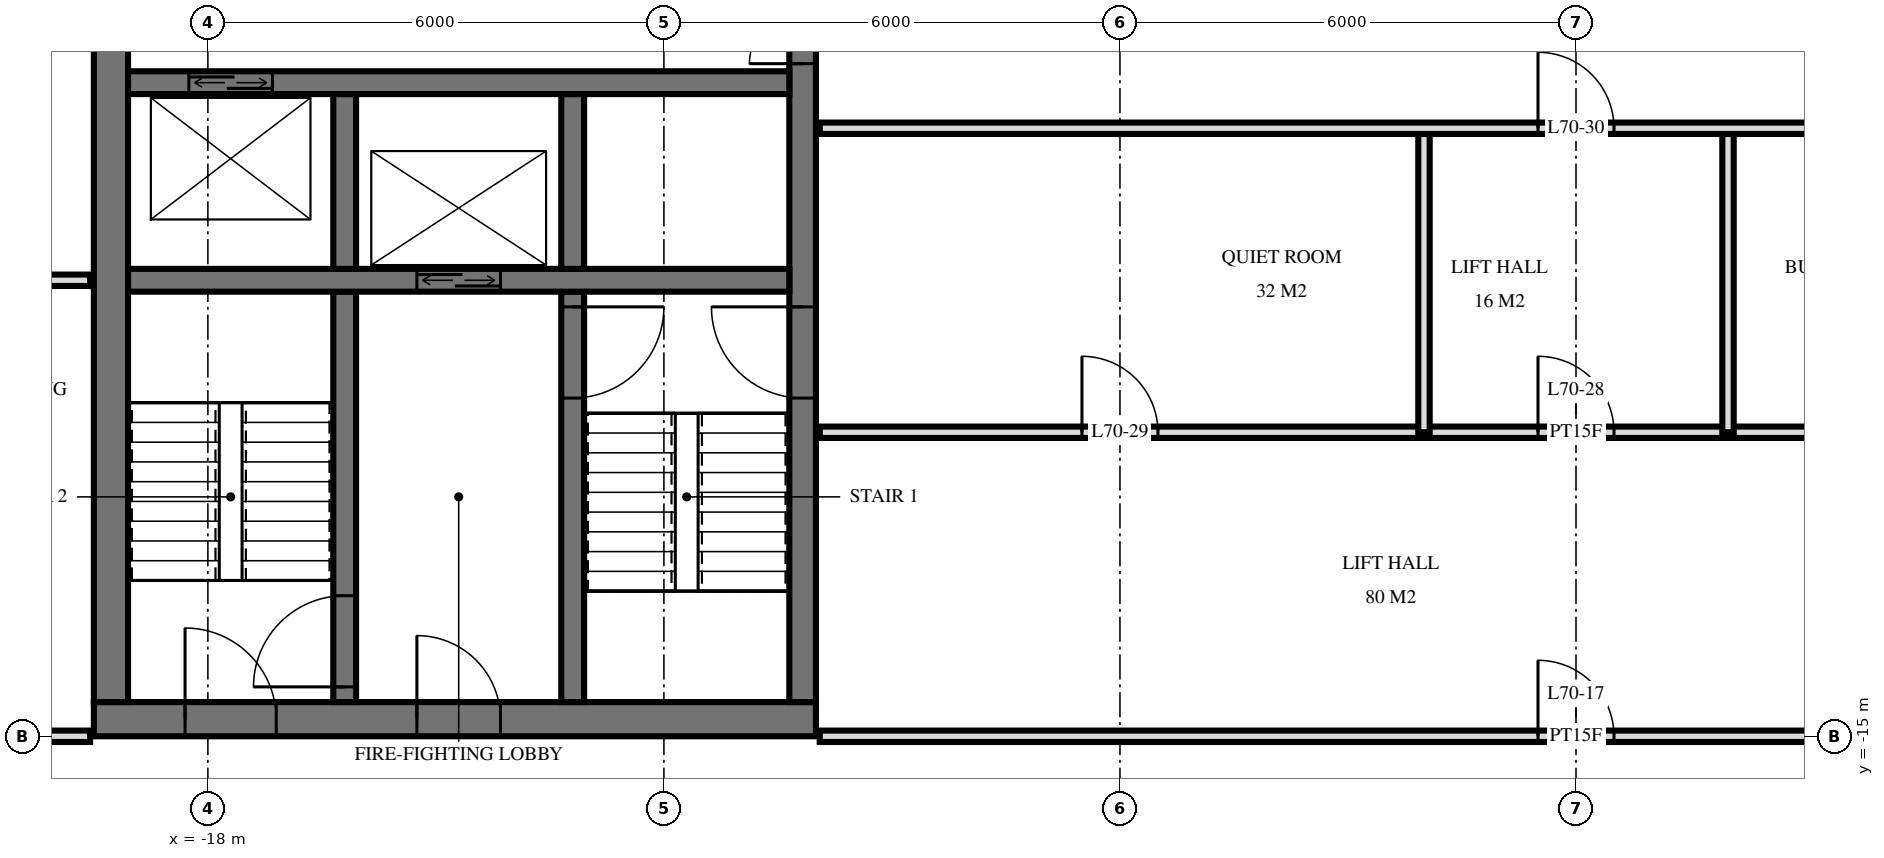
"""IFC4 building model, lengths in metres.
Left out: names, types, materials, properties, quantities, classifications, styles, units other than length and angle.
Written with IfcOpenShell. Run it as: python <this file> out.ifc"""

import sys

from ifc_helpers import new_model, si_unit, direction, frame, frame_2d, origin, place, context, subcontext, project, spatial, rectangle, extrude, element, fill, save


model = new_model("IFC4")
c1 = context("Model", 3, precision=1e-05, world=origin(), true_north=direction((0.0, 1.0)))
c2 = subcontext(c1, "Body", "Model", "MODEL_VIEW")
j1 = project(units=[si_unit("LENGTHUNIT", "METRE"), si_unit("PLANEANGLEUNIT", "RADIAN")], contexts=[c1])
p1 = place(None, origin())
s1 = spatial("IfcSite", under=j1, at=p1, CompositionType="ELEMENT")
p2 = place(p1, origin())
s2 = spatial("IfcBuilding", under=s1, at=p2, CompositionType="ELEMENT")
p3 = place(p2, frame((0.0, 0.0, 266.6)))
s3 = spatial("IfcBuildingStorey", under=s2, at=p3, CompositionType="ELEMENT", Elevation=266.6)
p4 = place(p3, frame((-19.5, -14.775, 0.0), z_axis=(0.0, 0.0, 1.0), x_axis=(1.0, 0.0, 0.0)))
e1 = element("IfcWall", 1, at=p4, inside=s3, PredefinedType="SHEAR", context=c2, shape_type="SweptSolid", body=[
    extrude(rectangle(XDim=9.5, YDim=0.45, at=frame_2d((4.75, 0.0))), origin(), (0.0, 0.0, 1.0), 3.5),
])
p5 = place(p4, frame((1.2, 0.0, 0.0)))
e2 = element("IfcOpeningElement", 2, at=p5, cuts=e1, PredefinedType="OPENING", context=c2, shape_type="SweptSolid", body=[
    extrude(rectangle(XDim=1.2, YDim=2.1, at=frame_2d((0.6, 1.05))), frame((0.0, 0.235, 0.0), z_axis=(0.0, -1.0, 0.0), x_axis=(1.0, 0.0, 0.0)), (0.0, 0.0, 1.0), 0.47),
])
p6 = place(p4, frame((4.25, 0.0, 0.0)))
e3 = element("IfcOpeningElement", 3, at=p6, cuts=e1, PredefinedType="OPENING", context=c2, shape_type="SweptSolid", body=[
    extrude(rectangle(XDim=1.1, YDim=2.1, at=frame_2d((0.55, 1.05))), frame((0.0, 0.235, 0.0), z_axis=(0.0, -1.0, 0.0), x_axis=(1.0, 0.0, 0.0)), (0.0, 0.0, 1.0), 0.47),
])
p7 = place(p3, frame((-10.175, -14.55, 0.0), z_axis=(0.0, 0.0, 1.0), x_axis=(0.0, 1.0, 0.0)))
e4 = element("IfcWall", 4, at=p7, inside=s3, PredefinedType="SHEAR", context=c2, shape_type="SweptSolid", body=[
    extrude(rectangle(XDim=14.1, YDim=0.35, at=frame_2d((7.05, 0.0))), origin(), (0.0, 0.0, 1.0), 3.5),
])
p8 = place(p7, frame((8.4, 0.0, 0.0)))
e5 = element("IfcOpeningElement", 5, at=p8, cuts=e4, PredefinedType="OPENING", context=c2, shape_type="SweptSolid", body=[
    extrude(rectangle(XDim=1.4, YDim=2.4, at=frame_2d((0.7, 1.2))), frame((0.0, 0.185, 0.0), z_axis=(0.0, -1.0, 0.0), x_axis=(1.0, 0.0, 0.0)), (0.0, 0.0, 1.0), 0.37),
])
p9 = place(p7, frame((10.0, 0.0, 0.0)))
e6 = element("IfcOpeningElement", 6, at=p9, cuts=e4, PredefinedType="OPENING", context=c2, shape_type="SweptSolid", body=[
    extrude(rectangle(XDim=1.4, YDim=2.4, at=frame_2d((0.7, 1.2))), frame((0.0, 0.185, 0.0), z_axis=(0.0, -1.0, 0.0), x_axis=(1.0, 0.0, 0.0)), (0.0, 0.0, 1.0), 0.37),
])
p10 = place(p7, frame((4.0, 0.0, 0.0)))
e7 = element("IfcOpeningElement", 7, at=p10, cuts=e4, PredefinedType="OPENING", context=c2, shape_type="SweptSolid", body=[
    extrude(rectangle(XDim=1.2, YDim=2.1, at=frame_2d((0.6, 1.05))), frame((0.0, 0.185, 0.0), z_axis=(0.0, -1.0, 0.0), x_axis=(1.0, 0.0, 0.0)), (0.0, 0.0, 1.0), 0.37),
])
p11 = place(p3, frame((-19.275, -14.55, 0.0), z_axis=(0.0, 0.0, 1.0), x_axis=(0.0, 1.0, 0.0)))
e8 = element("IfcWall", 8, at=p11, inside=s3, PredefinedType="SHEAR", context=c2, shape_type="SweptSolid", body=[
    extrude(rectangle(XDim=14.1, YDim=0.45, at=frame_2d((7.05, 0.0))), origin(), (0.0, 0.0, 1.0), 3.5),
])
p12 = place(p3, frame((-19.05, -6.4, 0.0), z_axis=(0.0, 0.0, 1.0), x_axis=(1.0, 0.0, 0.0)))
e9 = element("IfcWall", 9, at=p12, inside=s3, PredefinedType="SHEAR", context=c2, shape_type="SweptSolid", body=[
    extrude(rectangle(XDim=8.7, YDim=0.3, at=frame_2d((4.35, 0.0))), origin(), (0.0, 0.0, 1.0), 3.5),
])
p13 = place(p12, frame((0.8, 0.0, 0.0)))
e10 = element("IfcOpeningElement", 10, at=p13, cuts=e9, PredefinedType="OPENING", context=c2, shape_type="SweptSolid", body=[
    extrude(rectangle(XDim=1.1, YDim=2.1, at=frame_2d((0.55, 1.05))), frame((0.0, 0.16, 0.0), z_axis=(0.0, -1.0, 0.0), x_axis=(1.0, 0.0, 0.0)), (0.0, 0.0, 1.0), 0.32),
])
p14 = place(p3, frame((-19.05, -9.0, 0.0), z_axis=(0.0, 0.0, 1.0), x_axis=(1.0, 0.0, 0.0)))
e11 = element("IfcWall", 11, at=p14, inside=s3, PredefinedType="SHEAR", context=c2, shape_type="SweptSolid", body=[
    extrude(rectangle(XDim=8.7, YDim=0.3, at=frame_2d((4.35, 0.0))), origin(), (0.0, 0.0, 1.0), 3.5),
])
p15 = place(p14, frame((3.8, 0.0, 0.0)))
e12 = element("IfcOpeningElement", 12, at=p15, cuts=e11, PredefinedType="OPENING", context=c2, shape_type="SweptSolid", body=[
    extrude(rectangle(XDim=1.1, YDim=2.1, at=frame_2d((0.55, 1.05))), frame((0.0, 0.16, 0.0), z_axis=(0.0, -1.0, 0.0), x_axis=(1.0, 0.0, 0.0)), (0.0, 0.0, 1.0), 0.32),
])
p16 = place(p3, frame((-13.2, -8.85, 0.0), z_axis=(0.0, 0.0, 1.0), x_axis=(0.0, 1.0, 0.0)))
e13 = element("IfcWall", 13, at=p16, inside=s3, PredefinedType="SHEAR", context=c2, shape_type="SweptSolid", body=[
    extrude(rectangle(XDim=2.3, YDim=0.3, at=frame_2d((1.15, 0.0))), origin(), (0.0, 0.0, 1.0), 3.5),
])
p17 = place(p3, frame((-13.2, -14.55, 0.0), z_axis=(0.0, 0.0, 1.0), x_axis=(0.0, 1.0, 0.0)))
e14 = element("IfcWall", 14, at=p17, inside=s3, PredefinedType="SHEAR", context=c2, shape_type="SweptSolid", body=[
    extrude(rectangle(XDim=5.4, YDim=0.3, at=frame_2d((2.7, 0.0))), origin(), (0.0, 0.0, 1.0), 3.5),
])
p18 = place(p17, frame((4.0, 0.0, 0.0)))
e15 = element("IfcOpeningElement", 15, at=p18, cuts=e14, PredefinedType="OPENING", context=c2, shape_type="SweptSolid", body=[
    extrude(rectangle(XDim=1.2, YDim=2.1, at=frame_2d((0.6, 1.05))), frame((0.0, 0.16, 0.0), z_axis=(0.0, -1.0, 0.0), x_axis=(1.0, 0.0, 0.0)), (0.0, 0.0, 1.0), 0.32),
])
p19 = place(p3, frame((-16.2, -8.85, 0.0), z_axis=(0.0, 0.0, 1.0), x_axis=(0.0, 1.0, 0.0)))
e16 = element("IfcWall", 16, at=p19, inside=s3, PredefinedType="SHEAR", context=c2, shape_type="SweptSolid", body=[
    extrude(rectangle(XDim=2.3, YDim=0.3, at=frame_2d((1.15, 0.0))), origin(), (0.0, 0.0, 1.0), 3.5),
])
p20 = place(p3, frame((-16.2, -14.55, 0.0), z_axis=(0.0, 0.0, 1.0), x_axis=(0.0, 1.0, 0.0)))
e17 = element("IfcWall", 17, at=p20, inside=s3, PredefinedType="SHEAR", context=c2, shape_type="SweptSolid", body=[
    extrude(rectangle(XDim=5.4, YDim=0.3, at=frame_2d((2.7, 0.0))), origin(), (0.0, 0.0, 1.0), 3.5),
])
p21 = place(p20, frame((0.2, 0.0, 0.0)))
e18 = element("IfcOpeningElement", 18, at=p21, cuts=e17, PredefinedType="OPENING", context=c2, shape_type="SweptSolid", body=[
    extrude(rectangle(XDim=1.2, YDim=2.1, at=frame_2d((0.6, 1.05))), frame((0.0, 0.16, 0.0), z_axis=(0.0, -1.0, 0.0), x_axis=(1.0, 0.0, 0.0)), (0.0, 0.0, 1.0), 0.32),
])
for number, where, z_axis, x_axis in (
    (19, (2.0, -11.0, 0.0), (0.0, 0.0, 1.0), (0.0, 1.0, 0.0)),
    (20, (-2.0, -11.0, 0.0), (0.0, 0.0, 1.0), (0.0, 1.0, 0.0)),
):
    element("IfcWall", number, at=place(p3, frame(where, z_axis=z_axis, x_axis=x_axis)), inside=s3, PredefinedType="PARTITIONING", context=c2, shape_type="SweptSolid", body=[
        extrude(rectangle(XDim=4.0, YDim=0.15, at=frame_2d((2.0, 0.0))), origin(), (0.0, 0.0, 1.0), 3.22),
    ])
p22 = place(p3, frame((-22.92, -15.0, 0.0), z_axis=(0.0, 0.0, 1.0), x_axis=(1.0, 0.0, 0.0)))
e21 = element("IfcWall", 21, at=p22, inside=s3, PredefinedType="PARTITIONING", context=c2, shape_type="SweptSolid", body=[
    extrude(rectangle(XDim=3.37, YDim=0.15, at=frame_2d((1.685, 0.0))), origin(), (0.0, 0.0, 1.0), 3.22),
])
p23 = place(p22, frame((1.47, 0.0, 0.0)))
e22 = element("IfcOpeningElement", 22, at=p23, cuts=e21, PredefinedType="OPENING", context=c2, shape_type="SweptSolid", body=[
    extrude(rectangle(XDim=1.0, YDim=2.1, at=frame_2d((0.5, 1.05))), frame((0.0, 0.085, 0.0), z_axis=(0.0, -1.0, 0.0), x_axis=(1.0, 0.0, 0.0)), (0.0, 0.0, 1.0), 0.17),
])
p24 = place(p3, frame((-9.95, -15.0, 0.0), z_axis=(0.0, 0.0, 1.0), x_axis=(1.0, 0.0, 0.0)))
e23 = element("IfcWall", 23, at=p24, inside=s3, PredefinedType="PARTITIONING", context=c2, shape_type="SweptSolid", body=[
    extrude(rectangle(XDim=19.9, YDim=0.15, at=frame_2d((9.95, 0.0))), origin(), (0.0, 0.0, 1.0), 2.584),
])
p25 = place(p24, frame((9.45, 0.0, 0.0)))
e24 = element("IfcOpeningElement", 24, at=p25, cuts=e23, PredefinedType="OPENING", context=c2, shape_type="SweptSolid", body=[
    extrude(rectangle(XDim=1.0, YDim=2.1, at=frame_2d((0.5, 1.05))), frame((0.0, 0.085, 0.0), z_axis=(0.0, -1.0, 0.0), x_axis=(1.0, 0.0, 0.0)), (0.0, 0.0, 1.0), 0.17),
])
p26 = place(p3, frame((-9.95, -11.0, 0.0), z_axis=(0.0, 0.0, 1.0), x_axis=(1.0, 0.0, 0.0)))
e25 = element("IfcWall", 25, at=p26, inside=s3, PredefinedType="PARTITIONING", context=c2, shape_type="SweptSolid", body=[
    extrude(rectangle(XDim=19.9, YDim=0.15, at=frame_2d((9.95, 0.0))), origin(), (0.0, 0.0, 1.0), 3.22),
])
p27 = place(p26, frame((9.45, 0.0, 0.0)))
e26 = element("IfcOpeningElement", 26, at=p27, cuts=e25, PredefinedType="OPENING", context=c2, shape_type="SweptSolid", body=[
    extrude(rectangle(XDim=1.0, YDim=2.1, at=frame_2d((0.5, 1.05))), frame((0.0, 0.085, 0.0), z_axis=(0.0, -1.0, 0.0), x_axis=(1.0, 0.0, 0.0)), (0.0, 0.0, 1.0), 0.17),
])
p28 = place(p26, frame((3.45, 0.0, 0.0)))
e27 = element("IfcOpeningElement", 27, at=p28, cuts=e25, PredefinedType="OPENING", context=c2, shape_type="SweptSolid", body=[
    extrude(rectangle(XDim=1.0, YDim=2.1, at=frame_2d((0.5, 1.05))), frame((0.0, 0.085, 0.0), z_axis=(0.0, -1.0, 0.0), x_axis=(1.0, 0.0, 0.0)), (0.0, 0.0, 1.0), 0.17),
])
p29 = place(p3, frame((-22.92, -9.0, 0.0), z_axis=(0.0, 0.0, 1.0), x_axis=(1.0, 0.0, 0.0)))
e28 = element("IfcWall", 28, at=p29, inside=s3, PredefinedType="PARTITIONING", context=c2, shape_type="SweptSolid", body=[
    extrude(rectangle(XDim=3.37, YDim=0.15, at=frame_2d((1.685, 0.0))), origin(), (0.0, 0.0, 1.0), 3.22),
])
p30 = place(p29, frame((1.17, 0.0, 0.0)))
e29 = element("IfcOpeningElement", 29, at=p30, cuts=e28, PredefinedType="OPENING", context=c2, shape_type="SweptSolid", body=[
    extrude(rectangle(XDim=0.9, YDim=2.1, at=frame_2d((0.45, 1.05))), frame((0.0, 0.085, 0.0), z_axis=(0.0, -1.0, 0.0), x_axis=(1.0, 0.0, 0.0)), (0.0, 0.0, 1.0), 0.17),
])
p31 = place(p3, frame((-9.95, -7.0, 0.0), z_axis=(0.0, 0.0, 1.0), x_axis=(1.0, 0.0, 0.0)))
e30 = element("IfcWall", 30, at=p31, inside=s3, PredefinedType="PARTITIONING", context=c2, shape_type="SweptSolid", body=[
    extrude(rectangle(XDim=19.9, YDim=0.15, at=frame_2d((9.95, 0.0))), origin(), (0.0, 0.0, 1.0), 3.22),
])
p32 = place(p31, frame((9.45, 0.0, 0.0)))
e31 = element("IfcOpeningElement", 31, at=p32, cuts=e30, PredefinedType="OPENING", context=c2, shape_type="SweptSolid", body=[
    extrude(rectangle(XDim=1.0, YDim=2.1, at=frame_2d((0.5, 1.05))), frame((0.0, 0.085, 0.0), z_axis=(0.0, -1.0, 0.0), x_axis=(1.0, 0.0, 0.0)), (0.0, 0.0, 1.0), 0.17),
])
p33 = place(p31, frame((15.45, 0.0, 0.0)))
e32 = element("IfcOpeningElement", 32, at=p33, cuts=e30, PredefinedType="OPENING", context=c2, shape_type="SweptSolid", body=[
    extrude(rectangle(XDim=1.0, YDim=2.1, at=frame_2d((0.5, 1.05))), frame((0.0, 0.085, 0.0), z_axis=(0.0, -1.0, 0.0), x_axis=(1.0, 0.0, 0.0)), (0.0, 0.0, 1.0), 0.17),
])
p34 = place(p15, origin())
e33 = element("IfcDoor", 33, at=p34, inside=s3, OperationType="DOUBLE_DOOR_SLIDING", PredefinedType="USERDEFINED", context=c2, shape_type="SweptSolid", body=[
    extrude(rectangle(XDim=1.1, YDim=2.1, at=frame_2d((0.55, 1.05))), frame((0.0, 0.025, 0.0), z_axis=(0.0, -1.0, 0.0), x_axis=(1.0, 0.0, 0.0)), (0.0, 0.0, 1.0), 0.05),
])
fill(e12, e33)
p35 = place(p13, origin())
e34 = element("IfcDoor", 34, at=p35, inside=s3, OperationType="DOUBLE_DOOR_SLIDING", PredefinedType="USERDEFINED", context=c2, shape_type="SweptSolid", body=[
    extrude(rectangle(XDim=1.1, YDim=2.1, at=frame_2d((0.55, 1.05))), frame((0.0, 0.025, 0.0), z_axis=(0.0, -1.0, 0.0), x_axis=(1.0, 0.0, 0.0)), (0.0, 0.0, 1.0), 0.05),
])
fill(e10, e34)
p36 = place(p8, origin())
e35 = element("IfcDoor", 35, at=p36, inside=s3, OperationType="DOUBLE_DOOR_SINGLE_SWING", PredefinedType="DOOR", context=c2, shape_type="SweptSolid", body=[
    extrude(rectangle(XDim=1.4, YDim=2.4, at=frame_2d((0.7, 1.2))), frame((0.0, 0.025, 0.0), z_axis=(0.0, -1.0, 0.0), x_axis=(1.0, 0.0, 0.0)), (0.0, 0.0, 1.0), 0.05),
])
fill(e5, e35)
p37 = place(p10, origin())
e36 = element("IfcDoor", 36, at=p37, inside=s3, OperationType="SINGLE_SWING_LEFT", PredefinedType="DOOR", context=c2, shape_type="SweptSolid", body=[
    extrude(rectangle(XDim=1.2, YDim=2.1, at=frame_2d((0.6, 1.05))), frame((0.0, 0.025, 0.0), z_axis=(0.0, -1.0, 0.0), x_axis=(1.0, 0.0, 0.0)), (0.0, 0.0, 1.0), 0.05),
])
fill(e7, e36)
p38 = place(p5, origin())
e37 = element("IfcDoor", 37, at=p38, inside=s3, OperationType="SINGLE_SWING_RIGHT", PredefinedType="DOOR", context=c2, shape_type="SweptSolid", body=[
    extrude(rectangle(XDim=1.2, YDim=2.1, at=frame_2d((0.6, 1.05))), frame((0.0, 0.025, 0.0), z_axis=(0.0, -1.0, 0.0), x_axis=(1.0, 0.0, 0.0)), (0.0, 0.0, 1.0), 0.05),
])
fill(e2, e37)
p39 = place(p6, origin())
e38 = element("IfcDoor", 38, at=p39, inside=s3, OperationType="SINGLE_SWING_RIGHT", PredefinedType="DOOR", context=c2, shape_type="SweptSolid", body=[
    extrude(rectangle(XDim=1.1, YDim=2.1, at=frame_2d((0.55, 1.05))), frame((0.0, 0.025, 0.0), z_axis=(0.0, -1.0, 0.0), x_axis=(1.0, 0.0, 0.0)), (0.0, 0.0, 1.0), 0.05),
])
fill(e3, e38)
p40 = place(p18, frame((0.6, 0.0, 0.0), z_axis=(0.0, 0.0, 1.0), x_axis=(-1.0, 0.0, 0.0)))
e39 = element("IfcDoor", 39, at=p40, inside=s3, OperationType="SINGLE_SWING_RIGHT", PredefinedType="DOOR", context=c2, shape_type="SweptSolid", body=[
    extrude(rectangle(XDim=1.2, YDim=2.1, at=frame_2d((0.0, 1.05))), frame((0.0, -0.025, 0.0), z_axis=(0.0, 1.0, 0.0), x_axis=(-1.0, 0.0, 0.0)), (0.0, 0.0, 1.0), 0.05),
])
fill(e15, e39)
p41 = place(p21, origin())
e40 = element("IfcDoor", 40, at=p41, inside=s3, OperationType="SINGLE_SWING_RIGHT", PredefinedType="DOOR", context=c2, shape_type="SweptSolid", body=[
    extrude(rectangle(XDim=1.2, YDim=2.1, at=frame_2d((0.6, 1.05))), frame((0.0, 0.025, 0.0), z_axis=(0.0, -1.0, 0.0), x_axis=(1.0, 0.0, 0.0)), (0.0, 0.0, 1.0), 0.05),
])
fill(e18, e40)
p42 = place(p25, origin())
e41 = element("IfcDoor", 41, at=p42, inside=s3, OperationType="SINGLE_SWING_RIGHT", PredefinedType="DOOR", context=c2, shape_type="SweptSolid", body=[
    extrude(rectangle(XDim=1.0, YDim=2.1, at=frame_2d((0.5, 1.05))), frame((0.0, 0.025, 0.0), z_axis=(0.0, -1.0, 0.0), x_axis=(1.0, 0.0, 0.0)), (0.0, 0.0, 1.0), 0.05),
])
fill(e24, e41)
p43 = place(p27, origin())
e42 = element("IfcDoor", 42, at=p43, inside=s3, OperationType="SINGLE_SWING_RIGHT", PredefinedType="DOOR", context=c2, shape_type="SweptSolid", body=[
    extrude(rectangle(XDim=1.0, YDim=2.1, at=frame_2d((0.5, 1.05))), frame((0.0, 0.025, 0.0), z_axis=(0.0, -1.0, 0.0), x_axis=(1.0, 0.0, 0.0)), (0.0, 0.0, 1.0), 0.05),
])
fill(e26, e42)
p44 = place(p28, origin())
e43 = element("IfcDoor", 43, at=p44, inside=s3, OperationType="SINGLE_SWING_RIGHT", PredefinedType="DOOR", context=c2, shape_type="SweptSolid", body=[
    extrude(rectangle(XDim=1.0, YDim=2.1, at=frame_2d((0.5, 1.05))), frame((0.0, 0.025, 0.0), z_axis=(0.0, -1.0, 0.0), x_axis=(1.0, 0.0, 0.0)), (0.0, 0.0, 1.0), 0.05),
])
fill(e27, e43)
p45 = place(p32, origin())
e44 = element("IfcDoor", 44, at=p45, inside=s3, OperationType="SINGLE_SWING_RIGHT", PredefinedType="DOOR", context=c2, shape_type="SweptSolid", body=[
    extrude(rectangle(XDim=1.0, YDim=2.1, at=frame_2d((0.5, 1.05))), frame((0.0, 0.025, 0.0), z_axis=(0.0, -1.0, 0.0), x_axis=(1.0, 0.0, 0.0)), (0.0, 0.0, 1.0), 0.05),
])
fill(e31, e44)
save(model, sys.argv[1])
